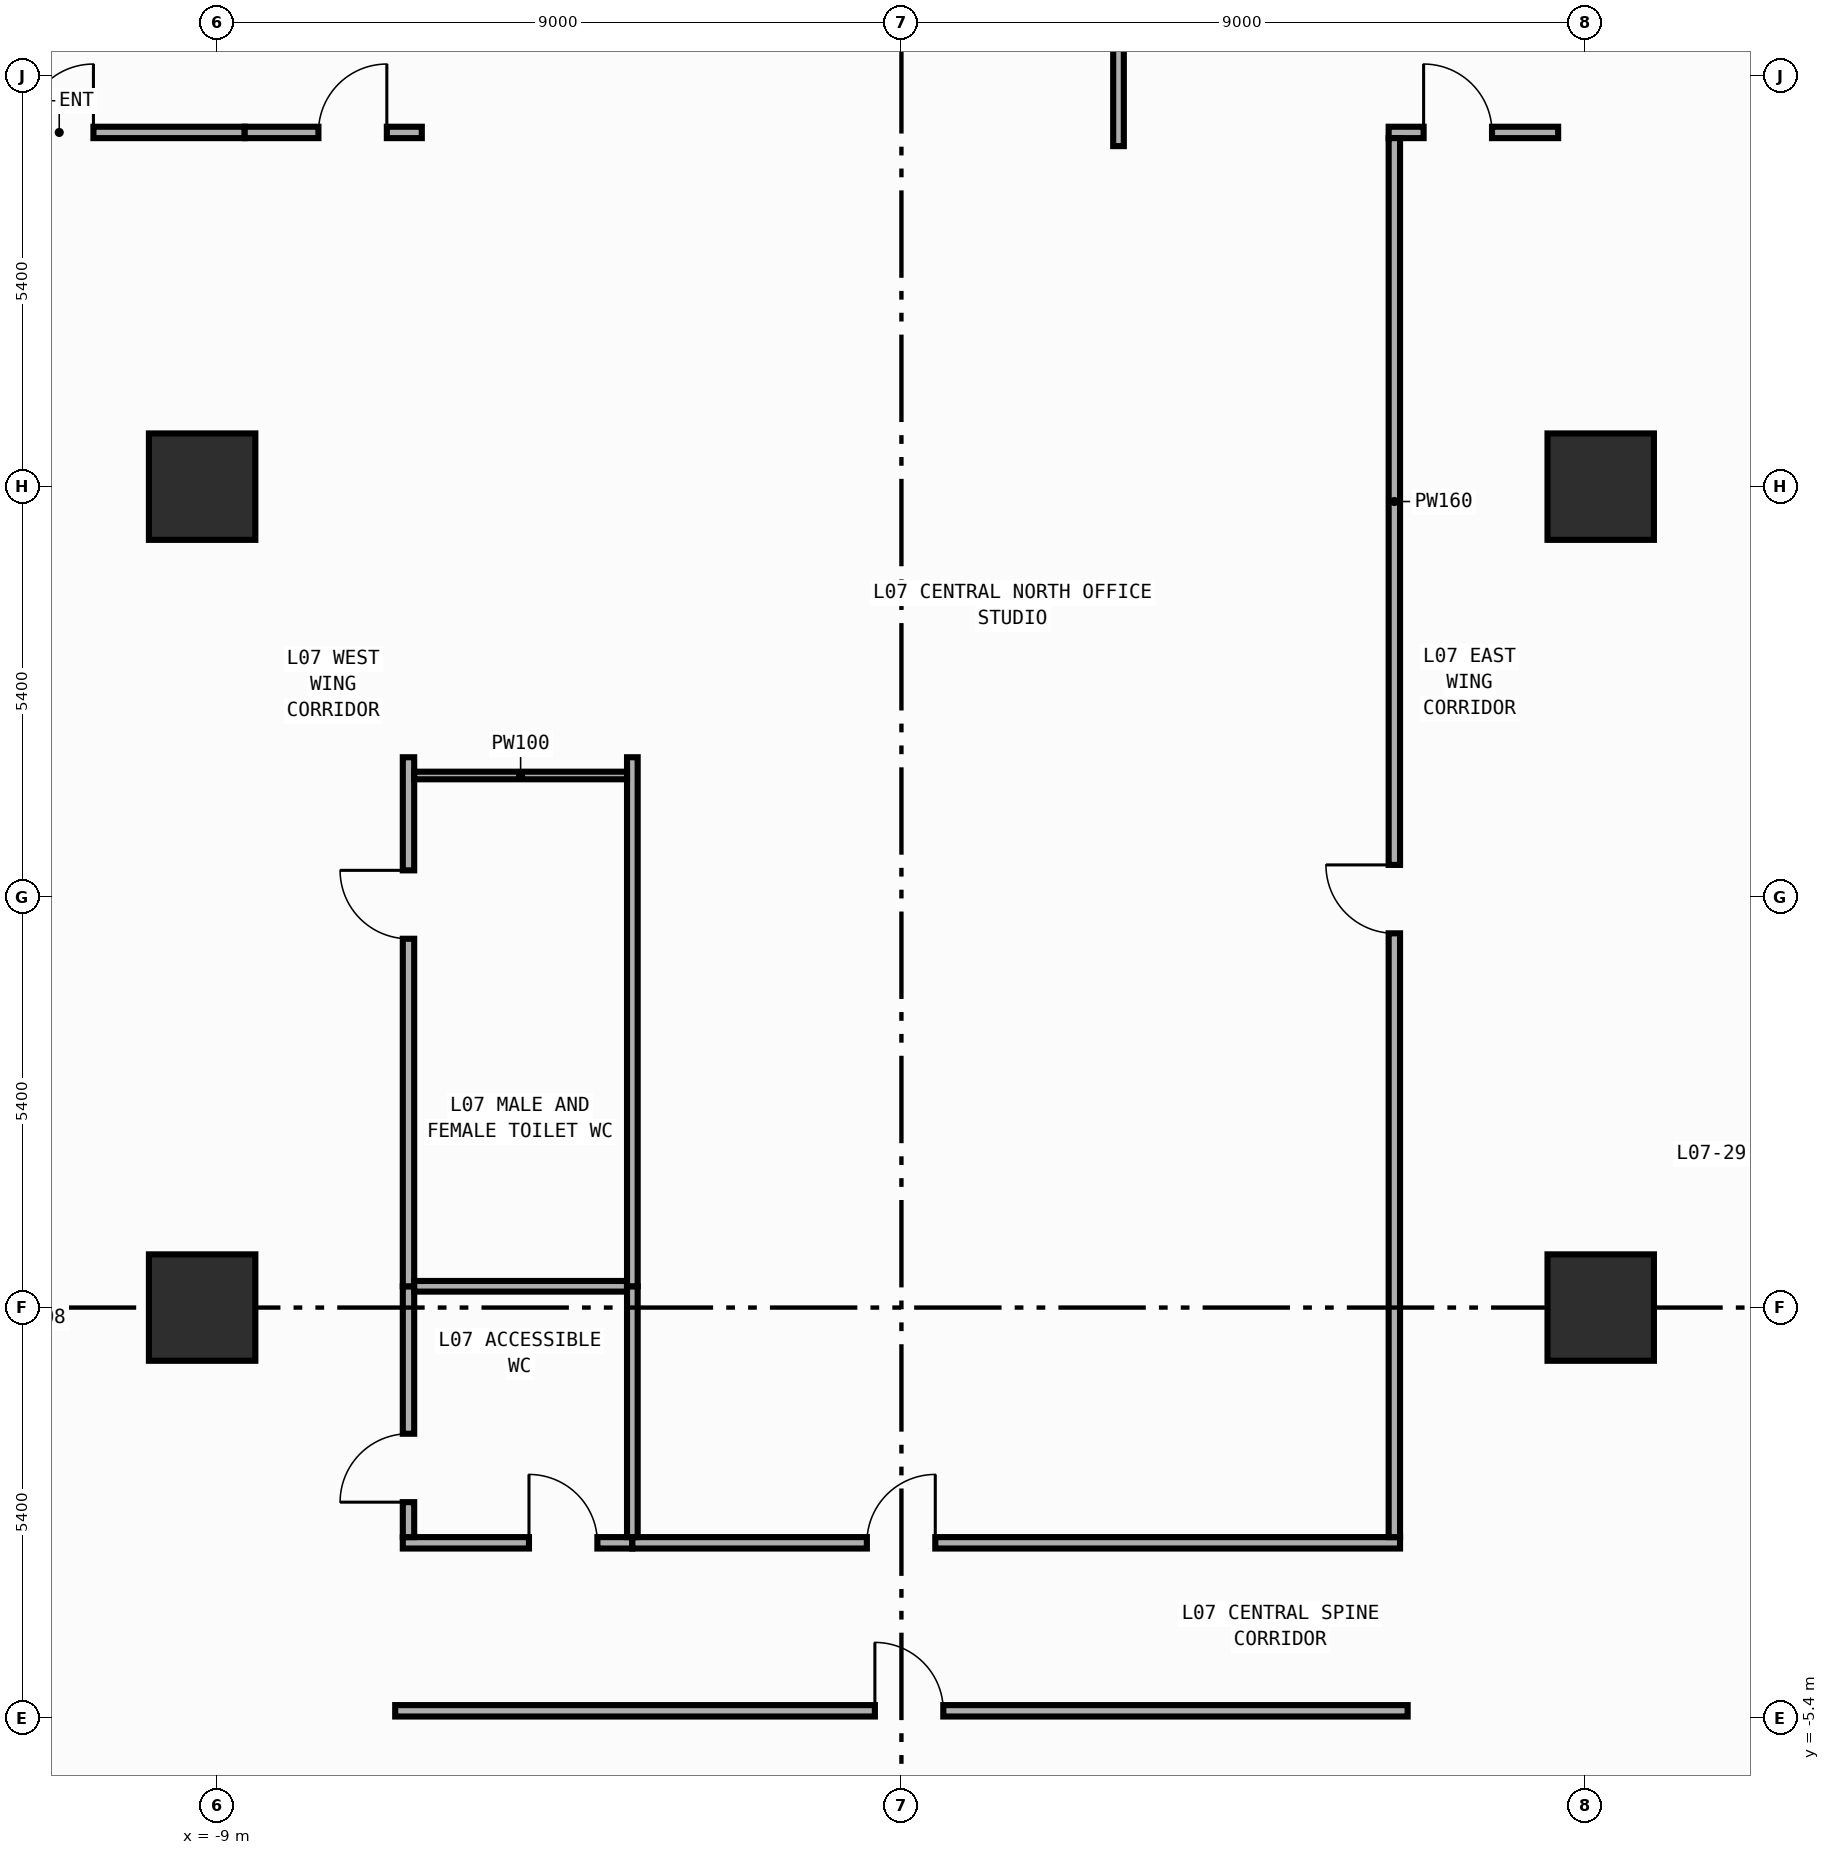
"""IFC4 building model, lengths in metres.
Left out: names, types, materials, properties, quantities, classifications, styles, units other than length and angle.
Written with IfcOpenShell. Run it as: python <this file> out.ifc"""

import sys

from ifc_helpers import new_model, si_unit, direction, frame, frame_2d, origin, origin_2d, place, context, subcontext, project, spatial, rectangle, extrude, element, fill, save


model = new_model("IFC4")
c1 = context("Model", 3, precision=1e-05, world=origin(), true_north=direction((0.0, 1.0)))
c2 = subcontext(c1, "Body", "Model", "MODEL_VIEW")
j1 = project(units=[si_unit("LENGTHUNIT", "METRE"), si_unit("PLANEANGLEUNIT", "RADIAN")], contexts=[c1])
p1 = place(None, origin())
s1 = spatial("IfcSite", under=j1, at=p1, CompositionType="ELEMENT")
p2 = place(p1, origin())
s2 = spatial("IfcBuilding", under=s1, at=p2, CompositionType="ELEMENT")
p3 = place(p2, frame((0.0, 0.0, 30.2)))
s3 = spatial("IfcBuildingStorey", under=s2, at=p3, CompositionType="ELEMENT", Elevation=30.2)
for number, where, z_axis, x_axis in (
    (1, (-9.2, 0.0, 0.0), (0.0, 0.0, 1.0), (1.0, 0.0, 0.0)),
    (2, (-9.2, 10.8, 0.0), (0.0, 0.0, 1.0), (1.0, 0.0, 0.0)),
    (3, (9.2, 0.0, 0.0), (0.0, 0.0, 1.0), (1.0, 0.0, 0.0)),
    (4, (9.2, 10.8, 0.0), (0.0, 0.0, 1.0), (1.0, 0.0, 0.0)),
):
    element("IfcColumn", number, at=place(p3, frame(where, z_axis=z_axis, x_axis=x_axis)), inside=s3, PredefinedType="COLUMN", context=c2, shape_type="SweptSolid", body=[
        extrude(rectangle(XDim=1.4, YDim=1.4, at=origin_2d()), origin(), (0.0, 0.0, 1.0), 4.2),
    ])
p4 = place(p3, frame((-11.99, 15.46, 0.0), z_axis=(0.0, 0.0, 1.0), x_axis=(1.0, 0.0, 0.0)))
e5 = element("IfcWall", 5, at=p4, inside=s3, PredefinedType="PARTITIONING", context=c2, shape_type="SweptSolid", body=[
    extrude(rectangle(XDim=3.35, YDim=0.15, at=frame_2d((1.675, 0.0))), origin(), (0.0, 0.0, 1.0), 3.94),
])
p5 = place(p4, frame((0.46, 0.0, 0.0)))
e6 = element("IfcOpeningElement", 6, at=p5, cuts=e5, PredefinedType="OPENING", context=c2, shape_type="SweptSolid", body=[
    extrude(rectangle(XDim=0.9, YDim=2.15, at=frame_2d((0.45, 1.075))), frame((0.0, 0.085, 0.0), z_axis=(0.0, -1.0, 0.0), x_axis=(1.0, 0.0, 0.0)), (0.0, 0.0, 1.0), 0.17),
])
p6 = place(p3, frame((-6.56, -3.095, 0.0), z_axis=(0.0, 0.0, 1.0), x_axis=(1.0, 0.0, 0.0)))
e7 = element("IfcWall", 7, at=p6, inside=s3, PredefinedType="PARTITIONING", context=c2, shape_type="SweptSolid", body=[
    extrude(rectangle(XDim=3.02, YDim=0.15, at=frame_2d((1.51, 0.0))), origin(), (0.0, 0.0, 1.0), 3.94),
])
p7 = place(p6, frame((1.66, 0.0, 0.0)))
e8 = element("IfcOpeningElement", 8, at=p7, cuts=e7, PredefinedType="OPENING", context=c2, shape_type="SweptSolid", body=[
    extrude(rectangle(XDim=0.9, YDim=2.15, at=frame_2d((0.45, 1.075))), frame((0.0, 0.085, 0.0), z_axis=(0.0, -1.0, 0.0), x_axis=(1.0, 0.0, 0.0)), (0.0, 0.0, 1.0), 0.17),
])
p8 = place(p3, frame((-3.54, -3.095, 0.0), z_axis=(0.0, 0.0, 1.0), x_axis=(1.0, 0.0, 0.0)))
e9 = element("IfcWall", 9, at=p8, inside=s3, PredefinedType="PARTITIONING", context=c2, shape_type="SweptSolid", body=[
    extrude(rectangle(XDim=10.1, YDim=0.15, at=frame_2d((5.05, 0.0))), origin(), (0.0, 0.0, 1.0), 3.94),
])
p9 = place(p8, frame((3.085, 0.0, 0.0)))
e10 = element("IfcOpeningElement", 10, at=p9, cuts=e9, PredefinedType="OPENING", context=c2, shape_type="SweptSolid", body=[
    extrude(rectangle(XDim=0.9, YDim=2.15, at=frame_2d((0.45, 1.075))), frame((0.0, 0.085, 0.0), z_axis=(0.0, -1.0, 0.0), x_axis=(1.0, 0.0, 0.0)), (0.0, 0.0, 1.0), 0.17),
])
p10 = place(p3, frame((-6.66, -5.305, 0.0), z_axis=(0.0, 0.0, 1.0), x_axis=(1.0, 0.0, 0.0)))
e11 = element("IfcWall", 11, at=p10, inside=s3, PredefinedType="PARTITIONING", context=c2, shape_type="SweptSolid", body=[
    extrude(rectangle(XDim=13.32, YDim=0.15, at=frame_2d((6.66, 0.0))), origin(), (0.0, 0.0, 1.0), 3.94),
])
p11 = place(p10, frame((6.311, 0.0, 0.0)))
e12 = element("IfcOpeningElement", 12, at=p11, cuts=e11, PredefinedType="OPENING", context=c2, shape_type="SweptSolid", body=[
    extrude(rectangle(XDim=0.9, YDim=2.15, at=frame_2d((0.45, 1.075))), frame((0.0, 0.085, 0.0), z_axis=(0.0, -1.0, 0.0), x_axis=(1.0, 0.0, 0.0)), (0.0, 0.0, 1.0), 0.17),
])
p12 = place(p3, frame((-8.64, 15.46, 0.0), z_axis=(0.0, 0.0, 1.0), x_axis=(1.0, 0.0, 0.0)))
e13 = element("IfcWall", 13, at=p12, inside=s3, PredefinedType="PARTITIONING", context=c2, shape_type="SweptSolid", body=[
    extrude(rectangle(XDim=2.33, YDim=0.15, at=frame_2d((1.165, 0.0))), origin(), (0.0, 0.0, 1.0), 3.94),
])
p13 = place(p12, frame((0.97, 0.0, 0.0)))
e14 = element("IfcOpeningElement", 14, at=p13, cuts=e13, PredefinedType="OPENING", context=c2, shape_type="SweptSolid", body=[
    extrude(rectangle(XDim=0.9, YDim=2.15, at=frame_2d((0.45, 1.075))), frame((0.0, 0.085, 0.0), z_axis=(0.0, -1.0, 0.0), x_axis=(1.0, 0.0, 0.0)), (0.0, 0.0, 1.0), 0.17),
])
p14 = place(p3, frame((-6.485, -3.02, 0.0), z_axis=(0.0, 0.0, 1.0), x_axis=(0.0, 1.0, 0.0)))
e15 = element("IfcWall", 15, at=p14, inside=s3, PredefinedType="PARTITIONING", context=c2, shape_type="SweptSolid", body=[
    extrude(rectangle(XDim=3.3, YDim=0.15, at=frame_2d((1.65, 0.0))), origin(), (0.0, 0.0, 1.0), 3.94),
])
p15 = place(p14, frame((0.46, 0.0, 0.0)))
e16 = element("IfcOpeningElement", 16, at=p15, cuts=e15, PredefinedType="OPENING", context=c2, shape_type="SweptSolid", body=[
    extrude(rectangle(XDim=0.9, YDim=2.15, at=frame_2d((0.45, 1.075))), frame((0.0, 0.085, 0.0), z_axis=(0.0, -1.0, 0.0), x_axis=(1.0, 0.0, 0.0)), (0.0, 0.0, 1.0), 0.17),
])
p16 = place(p3, frame((-6.485, 0.28, 0.0), z_axis=(0.0, 0.0, 1.0), x_axis=(0.0, 1.0, 0.0)))
e17 = element("IfcWall", 17, at=p16, inside=s3, PredefinedType="PARTITIONING", context=c2, shape_type="SweptSolid", body=[
    extrude(rectangle(XDim=6.96, YDim=0.15, at=frame_2d((3.48, 0.0))), origin(), (0.0, 0.0, 1.0), 3.94),
])
p17 = place(p16, frame((4.572, 0.0, 0.0)))
e18 = element("IfcOpeningElement", 18, at=p17, cuts=e17, PredefinedType="OPENING", context=c2, shape_type="SweptSolid", body=[
    extrude(rectangle(XDim=0.9, YDim=2.15, at=frame_2d((0.45, 1.075))), frame((0.0, 0.085, 0.0), z_axis=(0.0, -1.0, 0.0), x_axis=(1.0, 0.0, 0.0)), (0.0, 0.0, 1.0), 0.17),
])
p18 = place(p3, frame((6.41, 15.46, 0.0), z_axis=(0.0, 0.0, 1.0), x_axis=(1.0, 0.0, 0.0)))
e19 = element("IfcWall", 19, at=p18, inside=s3, PredefinedType="PARTITIONING", context=c2, shape_type="SweptSolid", body=[
    extrude(rectangle(XDim=2.23, YDim=0.15, at=frame_2d((1.115, 0.0))), origin(), (0.0, 0.0, 1.0), 3.94),
])
p19 = place(p18, frame((0.46, 0.0, 0.0)))
e20 = element("IfcOpeningElement", 20, at=p19, cuts=e19, PredefinedType="OPENING", context=c2, shape_type="SweptSolid", body=[
    extrude(rectangle(XDim=0.9, YDim=2.15, at=frame_2d((0.45, 1.075))), frame((0.0, 0.085, 0.0), z_axis=(0.0, -1.0, 0.0), x_axis=(1.0, 0.0, 0.0)), (0.0, 0.0, 1.0), 0.17),
])
p20 = place(p3, frame((6.485, -3.02, 0.0), z_axis=(0.0, 0.0, 1.0), x_axis=(0.0, 1.0, 0.0)))
e21 = element("IfcWall", 21, at=p20, inside=s3, PredefinedType="PARTITIONING", context=c2, shape_type="SweptSolid", body=[
    extrude(rectangle(XDim=18.405, YDim=0.15, at=frame_2d((9.203, 0.0))), origin(), (0.0, 0.0, 1.0), 3.94),
])
p21 = place(p20, frame((7.944, 0.0, 0.0)))
e22 = element("IfcOpeningElement", 22, at=p21, cuts=e21, PredefinedType="OPENING", context=c2, shape_type="SweptSolid", body=[
    extrude(rectangle(XDim=0.9, YDim=2.15, at=frame_2d((0.45, 1.075))), frame((0.0, 0.085, 0.0), z_axis=(0.0, -1.0, 0.0), x_axis=(1.0, 0.0, 0.0)), (0.0, 0.0, 1.0), 0.17),
])
p22 = place(p3, frame((2.856, 15.28, 0.0), z_axis=(0.0, 0.0, 1.0), x_axis=(0.0, 1.0, 0.0)))
e23 = element("IfcWall", 23, at=p22, inside=s3, PredefinedType="PARTITIONING", context=c2, shape_type="SweptSolid", body=[
    extrude(rectangle(XDim=11.575, YDim=0.14, at=frame_2d((5.788, 0.0))), origin(), (0.0, 0.0, 1.0), 3.94),
])
p23 = place(p3, frame((-6.41, 0.28, 0.0), z_axis=(0.0, 0.0, 1.0), x_axis=(1.0, 0.0, 0.0)))
e24 = element("IfcWall", 24, at=p23, inside=s3, PredefinedType="PARTITIONING", context=c2, shape_type="SweptSolid", body=[
    extrude(rectangle(XDim=2.8, YDim=0.14, at=frame_2d((1.4, 0.0))), origin(), (0.0, 0.0, 1.0), 3.14),
])
p24 = place(p3, frame((-3.54, -3.02, 0.0), z_axis=(0.0, 0.0, 1.0), x_axis=(0.0, 1.0, 0.0)))
e25 = element("IfcWall", 25, at=p24, inside=s3, PredefinedType="PARTITIONING", context=c2, shape_type="SweptSolid", body=[
    extrude(rectangle(XDim=3.3, YDim=0.14, at=frame_2d((1.65, 0.0))), origin(), (0.0, 0.0, 1.0), 3.94),
])
p25 = place(p3, frame((-3.54, 0.28, 0.0), z_axis=(0.0, 0.0, 1.0), x_axis=(0.0, 1.0, 0.0)))
e26 = element("IfcWall", 26, at=p25, inside=s3, PredefinedType="PARTITIONING", context=c2, shape_type="SweptSolid", body=[
    extrude(rectangle(XDim=6.96, YDim=0.14, at=frame_2d((3.48, 0.0))), origin(), (0.0, 0.0, 1.0), 3.94),
])
p26 = place(p3, frame((-6.41, 7.0, 0.0), z_axis=(0.0, 0.0, 1.0), x_axis=(1.0, 0.0, 0.0)))
e27 = element("IfcWall", 27, at=p26, inside=s3, PredefinedType="PARTITIONING", context=c2, shape_type="SweptSolid", body=[
    extrude(rectangle(XDim=2.8, YDim=0.1, at=frame_2d((1.4, 0.0))), origin(), (0.0, 0.0, 1.0), 3.94),
])
p27 = place(p5, origin())
e28 = element("IfcDoor", 28, at=p27, inside=s3, OperationType="SINGLE_SWING_RIGHT", PredefinedType="DOOR", context=c2, shape_type="SweptSolid", body=[
    extrude(rectangle(XDim=0.9, YDim=2.15, at=frame_2d((0.45, 1.075))), frame((0.0, 0.025, 0.0), z_axis=(0.0, -1.0, 0.0), x_axis=(1.0, 0.0, 0.0)), (0.0, 0.0, 1.0), 0.05),
])
fill(e6, e28)
p28 = place(p7, origin())
e29 = element("IfcDoor", 29, at=p28, inside=s3, OperationType="SINGLE_SWING_LEFT", PredefinedType="DOOR", context=c2, shape_type="SweptSolid", body=[
    extrude(rectangle(XDim=0.9, YDim=2.15, at=frame_2d((0.45, 1.075))), frame((0.0, 0.025, 0.0), z_axis=(0.0, -1.0, 0.0), x_axis=(1.0, 0.0, 0.0)), (0.0, 0.0, 1.0), 0.05),
])
fill(e8, e29)
p29 = place(p9, origin())
e30 = element("IfcDoor", 30, at=p29, inside=s3, OperationType="SINGLE_SWING_RIGHT", PredefinedType="DOOR", context=c2, shape_type="SweptSolid", body=[
    extrude(rectangle(XDim=0.9, YDim=2.15, at=frame_2d((0.45, 1.075))), frame((0.0, 0.025, 0.0), z_axis=(0.0, -1.0, 0.0), x_axis=(1.0, 0.0, 0.0)), (0.0, 0.0, 1.0), 0.05),
])
fill(e10, e30)
p30 = place(p11, origin())
e31 = element("IfcDoor", 31, at=p30, inside=s3, OperationType="SINGLE_SWING_LEFT", PredefinedType="DOOR", context=c2, shape_type="SweptSolid", body=[
    extrude(rectangle(XDim=0.9, YDim=2.15, at=frame_2d((0.45, 1.075))), frame((0.0, 0.025, 0.0), z_axis=(0.0, -1.0, 0.0), x_axis=(1.0, 0.0, 0.0)), (0.0, 0.0, 1.0), 0.05),
])
fill(e12, e31)
p31 = place(p13, origin())
e32 = element("IfcDoor", 32, at=p31, inside=s3, OperationType="SINGLE_SWING_RIGHT", PredefinedType="DOOR", context=c2, shape_type="SweptSolid", body=[
    extrude(rectangle(XDim=0.9, YDim=2.15, at=frame_2d((0.45, 1.075))), frame((0.0, 0.025, 0.0), z_axis=(0.0, -1.0, 0.0), x_axis=(1.0, 0.0, 0.0)), (0.0, 0.0, 1.0), 0.05),
])
fill(e14, e32)
p32 = place(p15, origin())
e33 = element("IfcDoor", 33, at=p32, inside=s3, OperationType="SINGLE_SWING_LEFT", PredefinedType="DOOR", context=c2, shape_type="SweptSolid", body=[
    extrude(rectangle(XDim=0.9, YDim=2.15, at=frame_2d((0.45, 1.075))), frame((0.0, 0.025, 0.0), z_axis=(0.0, -1.0, 0.0), x_axis=(1.0, 0.0, 0.0)), (0.0, 0.0, 1.0), 0.05),
])
fill(e16, e33)
p33 = place(p17, origin())
e34 = element("IfcDoor", 34, at=p33, inside=s3, OperationType="SINGLE_SWING_RIGHT", PredefinedType="DOOR", context=c2, shape_type="SweptSolid", body=[
    extrude(rectangle(XDim=0.9, YDim=2.15, at=frame_2d((0.45, 1.075))), frame((0.0, 0.025, 0.0), z_axis=(0.0, -1.0, 0.0), x_axis=(1.0, 0.0, 0.0)), (0.0, 0.0, 1.0), 0.05),
])
fill(e18, e34)
p34 = place(p19, origin())
e35 = element("IfcDoor", 35, at=p34, inside=s3, OperationType="SINGLE_SWING_LEFT", PredefinedType="DOOR", context=c2, shape_type="SweptSolid", body=[
    extrude(rectangle(XDim=0.9, YDim=2.15, at=frame_2d((0.45, 1.075))), frame((0.0, 0.025, 0.0), z_axis=(0.0, -1.0, 0.0), x_axis=(1.0, 0.0, 0.0)), (0.0, 0.0, 1.0), 0.05),
])
fill(e20, e35)
p35 = place(p21, origin())
e36 = element("IfcDoor", 36, at=p35, inside=s3, OperationType="SINGLE_SWING_RIGHT", PredefinedType="DOOR", context=c2, shape_type="SweptSolid", body=[
    extrude(rectangle(XDim=0.9, YDim=2.15, at=frame_2d((0.45, 1.075))), frame((0.0, 0.025, 0.0), z_axis=(0.0, -1.0, 0.0), x_axis=(1.0, 0.0, 0.0)), (0.0, 0.0, 1.0), 0.05),
])
fill(e22, e36)
save(model, sys.argv[1])
